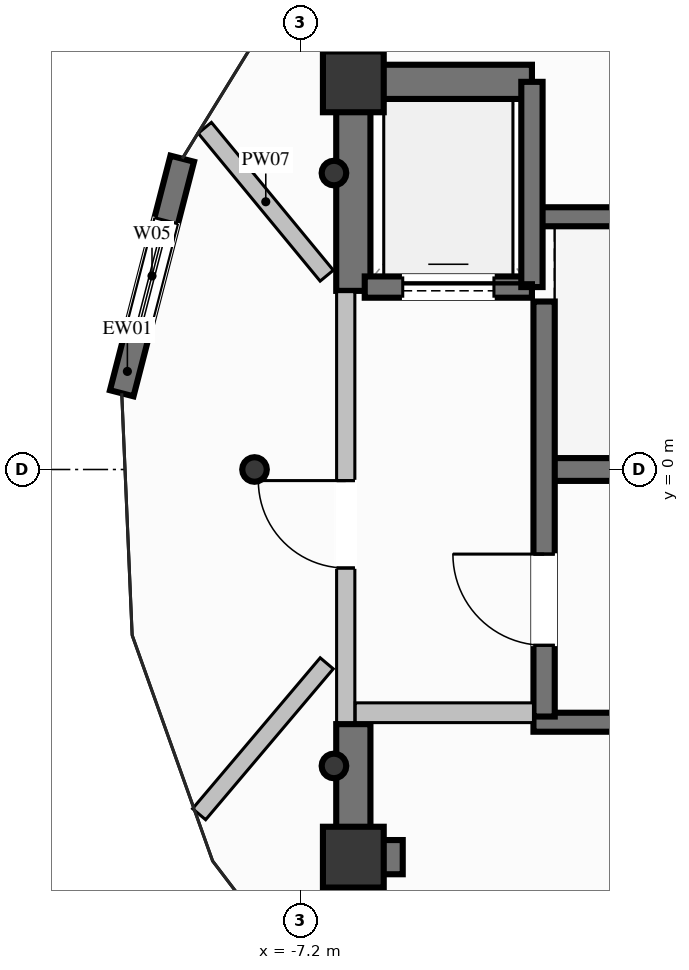
"""IFC4 building model, lengths in metres.
Left out: names, types, materials, properties, quantities, classifications, styles, units other than length and angle.
Written with IfcOpenShell. Run it as: python <this file> out.ifc"""

import sys

from ifc_helpers import new_model, si_unit, direction, frame, frame_2d, origin, origin_2d, place, context, subcontext, project, spatial, rectangle, hollow_circle, extrude, element, fill, save


model = new_model("IFC4")
c1 = context("Model", 3, precision=1e-05, world=origin(), true_north=direction((0.0, 1.0)))
c2 = subcontext(c1, "Body", "Model", "MODEL_VIEW")
j1 = project(units=[si_unit("LENGTHUNIT", "METRE"), si_unit("PLANEANGLEUNIT", "RADIAN")], contexts=[c1])
p1 = place(None, origin())
s1 = spatial("IfcSite", under=j1, at=p1, CompositionType="ELEMENT")
p2 = place(p1, origin())
s2 = spatial("IfcBuilding", under=s1, at=p2, CompositionType="ELEMENT")
p3 = place(p2, frame((0.0, 0.0, 327.4)))
s3 = spatial("IfcBuildingStorey", under=s2, at=p3, CompositionType="ELEMENT", Elevation=327.4)
for number, where, z_axis, x_axis in (
    (1, (-6.5, -5.1, 0.0), (0.0, 0.0, 1.0), (1.0, 0.0, 0.0)),
    (2, (-6.5, 5.1, 0.0), (0.0, 0.0, 1.0), (1.0, 0.0, 0.0)),
):
    element("IfcColumn", number, at=place(p3, frame(where, z_axis=z_axis, x_axis=x_axis)), inside=s3, PredefinedType="COLUMN", context=c2, shape_type="SweptSolid", body=[
        extrude(rectangle(XDim=0.8, YDim=0.8, at=origin_2d()), origin(), (0.0, 0.0, 1.0), 6.4),
    ])
p4 = place(p3, frame((-3.99, 0.0, 0.0), z_axis=(0.0, 0.0, 1.0), x_axis=(1.0, 0.0, 0.0)))
e3 = element("IfcWall", 3, at=p4, inside=s3, PredefinedType="SHEAR", context=c2, shape_type="SweptSolid", body=[
    extrude(rectangle(XDim=7.98, YDim=0.3, at=frame_2d((3.99, 0.0))), origin(), (0.0, 0.0, 1.0), 6.4),
])
for number, where, z_axis, x_axis in (
    (4, (-4.13, -3.325, 0.0), (0.0, 0.0, 1.0), (1.0, 0.0, 0.0)),
    (5, (-4.13, 3.325, 0.0), (0.0, 0.0, 1.0), (1.0, 0.0, 0.0)),
):
    element("IfcWall", number, at=place(p3, frame(where, z_axis=z_axis, x_axis=x_axis)), inside=s3, PredefinedType="SOLIDWALL", context=c2, shape_type="SweptSolid", body=[
        extrude(rectangle(XDim=8.26, YDim=0.25, at=frame_2d((4.13, 0.0))), origin(), (0.0, 0.0, 1.0), 6.4),
    ])
p5 = place(p3, frame((-6.275, -5.1, 0.0), z_axis=(0.0, 0.0, 1.0), x_axis=(1.0, 0.0, 0.0)))
e6 = element("IfcWall", 6, at=p5, inside=s3, PredefinedType="SHEAR", context=c2, shape_type="SweptSolid", body=[
    extrude(rectangle(XDim=0.425, YDim=0.45, at=frame_2d((0.212, 0.0))), origin(), (0.0, 0.0, 1.0), 6.4),
])
p6 = place(p3, frame((-6.275, 5.1, 0.0), z_axis=(0.0, 0.0, 1.0), x_axis=(1.0, 0.0, 0.0)))
e7 = element("IfcWall", 7, at=p6, inside=s3, PredefinedType="SHEAR", context=c2, shape_type="SweptSolid", body=[
    extrude(rectangle(XDim=2.125, YDim=0.45, at=frame_2d((1.062, 0.0))), origin(), (0.0, 0.0, 1.0), 6.4),
])
p7 = place(p3, frame((-6.5, 2.35, 0.0), z_axis=(0.0, 0.0, 1.0), x_axis=(0.0, 1.0, 0.0)))
e8 = element("IfcWall", 8, at=p7, inside=s3, PredefinedType="SHEAR", context=c2, shape_type="SweptSolid", body=[
    extrude(rectangle(XDim=2.975, YDim=0.45, at=frame_2d((1.487, 0.0))), origin(), (0.0, 0.0, 1.0), 6.4),
])
p8 = place(p3, frame((-6.5, -5.325, 0.0), z_axis=(0.0, 0.0, 1.0), x_axis=(0.0, 1.0, 0.0)))
e9 = element("IfcWall", 9, at=p8, inside=s3, PredefinedType="SHEAR", context=c2, shape_type="SweptSolid", body=[
    extrude(rectangle(XDim=1.975, YDim=0.45, at=frame_2d((0.987, 0.0))), origin(), (0.0, 0.0, 1.0), 6.4),
])
for number, where, z_axis, x_axis in (
    (10, (-6.755, 3.9, 0.0), (0.0, 0.0, 1.0), (1.0, 0.0, 0.0)),
    (11, (-7.8, 0.0, 0.0), (0.0, 0.0, 1.0), (1.0, 0.0, 0.0)),
    (12, (-6.755, -3.9, 0.0), (0.0, 0.0, 1.0), (1.0, 0.0, 0.0)),
):
    element("IfcColumn", number, at=place(p3, frame(where, z_axis=z_axis, x_axis=x_axis)), inside=s3, PredefinedType="COLUMN", context=c2, shape_type="SweptSolid", body=[
        extrude(hollow_circle(Radius=0.162, WallThickness=0.014, at=origin_2d()), origin(), (0.0, 0.0, 1.0), 6.4),
    ])
p9 = place(p3, frame((-9.547, 1.003, 0.0), z_axis=(0.0, 0.0, 1.0), x_axis=(0.249792300877, 0.968299440474, 0.0)))
e13 = element("IfcWall", 13, at=p9, inside=s3, PredefinedType="SOLIDWALL", context=c2, shape_type="SweptSolid", body=[
    extrude(rectangle(XDim=3.187, YDim=0.32, at=frame_2d((1.594, 0.0))), origin(), (0.0, 0.0, 1.0), 6.12),
])
p10 = place(p9, frame((0.844, 0.0, 1.1)))
e14 = element("IfcOpeningElement", 14, at=p10, cuts=e13, PredefinedType="OPENING", context=c2, shape_type="SweptSolid", body=[
    extrude(rectangle(XDim=1.5, YDim=1.2, at=frame_2d((0.75, 0.6))), frame((0.0, 0.17, 0.0), z_axis=(0.0, -1.0, 0.0), x_axis=(1.0, 0.0, 0.0)), (0.0, 0.0, 1.0), 0.34),
])
p11 = place(p3, frame((-6.35, 2.4, 0.0), z_axis=(0.0, 0.0, 1.0), x_axis=(1.0, 0.0, 0.0)))
e15 = element("IfcWall", 15, at=p11, inside=s3, PredefinedType="SOLIDWALL", context=c2, shape_type="SweptSolid", body=[
    extrude(rectangle(XDim=2.2, YDim=0.28, at=frame_2d((1.1, 0.0))), origin(), (0.0, 0.0, 1.0), 6.12),
])
p12 = place(p11, frame((0.5, 0.0, 0.0)))
e16 = element("IfcOpeningElement", 16, at=p12, cuts=e15, PredefinedType="OPENING", context=c2, shape_type="SweptSolid", body=[
    extrude(rectangle(XDim=1.2, YDim=2.2, at=frame_2d((0.6, 1.1))), frame((0.0, 0.15, 0.0), z_axis=(0.0, -1.0, 0.0), x_axis=(1.0, 0.0, 0.0)), (0.0, 0.0, 1.0), 0.3),
])
p13 = place(p3, frame((-4.15, 2.4, 0.0), z_axis=(0.0, 0.0, 1.0), x_axis=(0.0, 1.0, 0.0)))
e17 = element("IfcWall", 17, at=p13, inside=s3, PredefinedType="SOLIDWALL", context=c2, shape_type="SweptSolid", body=[
    extrude(rectangle(XDim=2.7, YDim=0.28, at=frame_2d((1.35, 0.0))), origin(), (0.0, 0.0, 1.0), 6.12),
])
p14 = place(p3, frame((-3.99, -3.25, 0.0), z_axis=(0.0, 0.0, 1.0), x_axis=(0.0, 1.0, 0.0)))
e18 = element("IfcWall", 18, at=p14, inside=s3, PredefinedType="SOLIDWALL", context=c2, shape_type="SweptSolid", body=[
    extrude(rectangle(XDim=5.46, YDim=0.28, at=frame_2d((2.73, 0.0))), origin(), (0.0, 0.0, 1.0), 6.12),
])
p15 = place(p14, frame((0.937, 0.0, 0.0)))
e19 = element("IfcOpeningElement", 19, at=p15, cuts=e18, PredefinedType="OPENING", context=c2, shape_type="SweptSolid", body=[
    extrude(rectangle(XDim=1.2, YDim=2.2, at=frame_2d((0.6, 1.1))), frame((0.0, 0.15, 0.0), z_axis=(0.0, -1.0, 0.0), x_axis=(1.0, 0.0, 0.0)), (0.0, 0.0, 1.0), 0.3),
])
p16 = place(p3, frame((-6.6, -3.33, 0.0), z_axis=(0.0, 0.0, 1.0), x_axis=(0.0, 1.0, 0.0)))
e20 = element("IfcWall", 20, at=p16, inside=s3, PredefinedType="PARTITIONING", context=c2, shape_type="SweptSolid", body=[
    extrude(rectangle(XDim=5.67, YDim=0.24, at=frame_2d((2.835, 0.0))), origin(), (0.0, 0.0, 1.0), 5.005),
])
p17 = place(p16, frame((2.034, 0.0, 0.0)))
e21 = element("IfcOpeningElement", 21, at=p17, cuts=e20, PredefinedType="OPENING", context=c2, shape_type="SweptSolid", body=[
    extrude(rectangle(XDim=1.15, YDim=2.2, at=frame_2d((0.575, 1.1))), frame((0.0, 0.13, 0.0), z_axis=(0.0, -1.0, 0.0), x_axis=(1.0, 0.0, 0.0)), (0.0, 0.0, 1.0), 0.26),
])
p18 = place(p3, frame((-6.475, -3.2, 0.0), z_axis=(0.0, 0.0, 1.0), x_axis=(1.0, 0.0, 0.0)))
e22 = element("IfcWall", 22, at=p18, inside=s3, PredefinedType="PARTITIONING", context=c2, shape_type="SweptSolid", body=[
    extrude(rectangle(XDim=2.345, YDim=0.26, at=frame_2d((1.173, 0.0))), origin(), (0.0, 0.0, 1.0), 6.12),
])
p19 = place(p3, frame((-6.85, 2.55, 0.0), z_axis=(0.0, 0.0, 1.0), x_axis=(-0.636223045641, 0.771505175741, 0.0)))
e23 = element("IfcWall", 23, at=p19, inside=s3, PredefinedType="PARTITIONING", context=c2, shape_type="SweptSolid", body=[
    extrude(rectangle(XDim=2.521, YDim=0.225, at=frame_2d((1.261, 0.0))), origin(), (0.0, 0.0, 1.0), 6.12),
])
p20 = place(p3, frame((-6.85, -2.55, 0.0), z_axis=(0.0, 0.0, 1.0), x_axis=(-0.645820150002, -0.76348957678, 0.0)))
e24 = element("IfcWall", 24, at=p20, inside=s3, PredefinedType="PARTITIONING", context=c2, shape_type="SweptSolid", body=[
    extrude(rectangle(XDim=2.6, YDim=0.225, at=frame_2d((1.3, 0.0))), origin(), (0.0, 0.0, 1.0), 6.12),
])
p21 = place(p10, origin())
e25 = element("IfcWindow", 25, at=p21, inside=s3, PartitioningType="SINGLE_PANEL", PredefinedType="WINDOW", context=c2, shape_type="SweptSolid", body=[
    extrude(rectangle(XDim=1.5, YDim=1.2, at=frame_2d((0.75, 0.6))), frame((0.0, 0.03, 0.0), z_axis=(0.0, -1.0, 0.0), x_axis=(1.0, 0.0, 0.0)), (0.0, 0.0, 1.0), 0.06),
])
fill(e14, e25)
p22 = place(p12, origin())
e26 = element("IfcDoor", 26, at=p22, inside=s3, OperationType="SLIDING_TO_LEFT", PredefinedType="DOOR", context=c2, shape_type="SweptSolid", body=[
    extrude(rectangle(XDim=1.2, YDim=2.2, at=frame_2d((0.6, 1.1))), frame((0.0, 0.025, 0.0), z_axis=(0.0, -1.0, 0.0), x_axis=(1.0, 0.0, 0.0)), (0.0, 0.0, 1.0), 0.05),
])
fill(e16, e26)
p23 = place(p15, origin())
e27 = element("IfcDoor", 27, at=p23, inside=s3, OperationType="SINGLE_SWING_RIGHT", PredefinedType="DOOR", context=c2, shape_type="SweptSolid", body=[
    extrude(rectangle(XDim=1.2, YDim=2.2, at=frame_2d((0.6, 1.1))), frame((0.0, 0.025, 0.0), z_axis=(0.0, -1.0, 0.0), x_axis=(1.0, 0.0, 0.0)), (0.0, 0.0, 1.0), 0.05),
])
fill(e19, e27)
p24 = place(p17, origin())
e28 = element("IfcDoor", 28, at=p24, inside=s3, OperationType="SINGLE_SWING_RIGHT", PredefinedType="DOOR", context=c2, shape_type="SweptSolid", body=[
    extrude(rectangle(XDim=1.15, YDim=2.2, at=frame_2d((0.575, 1.1))), frame((0.0, 0.025, 0.0), z_axis=(0.0, -1.0, 0.0), x_axis=(1.0, 0.0, 0.0)), (0.0, 0.0, 1.0), 0.05),
])
fill(e21, e28)
save(model, sys.argv[1])
